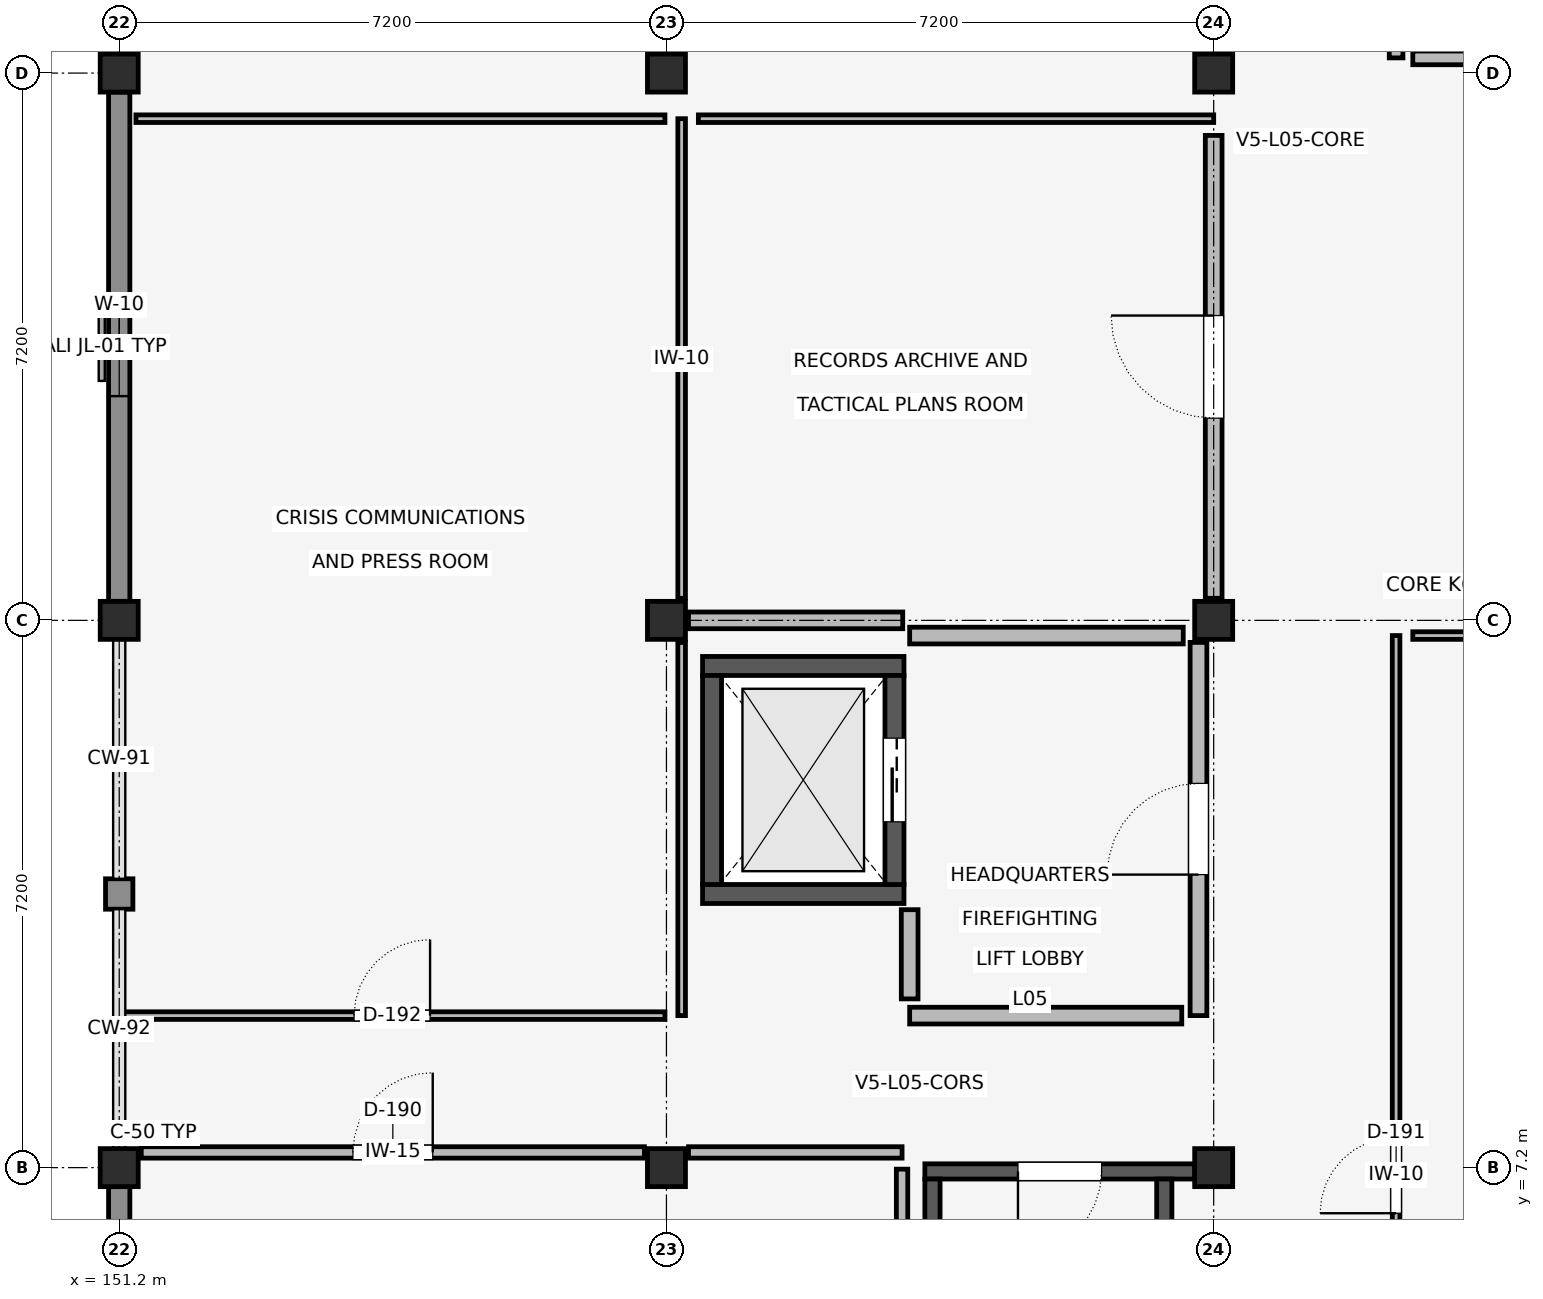
"""IFC4 building model, lengths in metres.
Left out: names, types, materials, properties, quantities, classifications, styles, units other than length and angle.
Written with IfcOpenShell. Run it as: python <this file> out.ifc"""

import sys

from ifc_helpers import new_model, si_unit, direction, frame, frame_2d, origin, origin_2d, place, context, subcontext, project, spatial, rectangle, extrude, element, fill, save


model = new_model("IFC4")
c1 = context("Model", 3, precision=1e-05, world=origin(), true_north=direction((0.0, 1.0)))
c2 = subcontext(c1, "Body", "Model", "MODEL_VIEW")
j1 = project(units=[si_unit("LENGTHUNIT", "METRE"), si_unit("PLANEANGLEUNIT", "RADIAN")], contexts=[c1])
p1 = place(None, origin())
s1 = spatial("IfcSite", under=j1, at=p1, CompositionType="ELEMENT")
p2 = place(p1, origin())
s2 = spatial("IfcBuilding", under=s1, at=p2, CompositionType="ELEMENT")
p3 = place(p2, frame((0.0, 0.0, 21.3)))
s3 = spatial("IfcBuildingStorey", under=s2, at=p3, CompositionType="ELEMENT", Elevation=21.3)
for number, where, z_axis, x_axis in (
    (1, (151.2, 7.2, 0.0), (0.0, 0.0, 1.0), (1.0, 0.0, 0.0)),
    (2, (151.2, 14.4, 0.0), (0.0, 0.0, 1.0), (1.0, 0.0, 0.0)),
    (3, (151.2, 21.6, 0.0), (0.0, 0.0, 1.0), (1.0, 0.0, 0.0)),
    (4, (158.4, 7.2, 0.0), (0.0, 0.0, 1.0), (1.0, 0.0, 0.0)),
    (5, (158.4, 14.4, 0.0), (0.0, 0.0, 1.0), (1.0, 0.0, 0.0)),
    (6, (158.4, 21.6, 0.0), (0.0, 0.0, 1.0), (1.0, 0.0, 0.0)),
    (7, (165.6, 7.2, 0.0), (0.0, 0.0, 1.0), (1.0, 0.0, 0.0)),
    (8, (165.6, 14.4, 0.0), (0.0, 0.0, 1.0), (1.0, 0.0, 0.0)),
    (9, (165.6, 21.6, 0.0), (0.0, 0.0, 1.0), (1.0, 0.0, 0.0)),
):
    element("IfcColumn", number, at=place(p3, frame(where, z_axis=z_axis, x_axis=x_axis)), inside=s3, PredefinedType="COLUMN", context=c2, shape_type="SweptSolid", body=[
        extrude(rectangle(XDim=0.5, YDim=0.5, at=origin_2d()), origin(), (0.0, 0.0, 1.0), 3.9),
    ])
for number, where, z_axis, x_axis in (
    (10, (158.875, 10.8, 0.0), (0.0, 0.0, 1.0), (1.0, 0.0, 0.0)),
    (11, (158.875, 13.8, 0.0), (0.0, 0.0, 1.0), (1.0, 0.0, 0.0)),
):
    element("IfcWall", number, at=place(p3, frame(where, z_axis=z_axis, x_axis=x_axis)), inside=s3, PredefinedType="SHEAR", context=c2, shape_type="SweptSolid", body=[
        extrude(rectangle(XDim=2.65, YDim=0.25, at=frame_2d((1.325, 0.0))), origin(), (0.0, 0.0, 1.0), 3.65),
    ])
p4 = place(p3, frame((159.0, 10.925, 0.0), z_axis=(0.0, 0.0, 1.0), x_axis=(0.0, 1.0, 0.0)))
e12 = element("IfcWall", 12, at=p4, inside=s3, PredefinedType="SHEAR", context=c2, shape_type="SweptSolid", body=[
    extrude(rectangle(XDim=2.75, YDim=0.25, at=frame_2d((1.375, 0.0))), origin(), (0.0, 0.0, 1.0), 3.65),
])
p5 = place(p3, frame((161.4, 10.925, 0.0), z_axis=(0.0, 0.0, 1.0), x_axis=(0.0, 1.0, 0.0)))
e13 = element("IfcWall", 13, at=p5, inside=s3, PredefinedType="SHEAR", context=c2, shape_type="SweptSolid", body=[
    extrude(rectangle(XDim=2.75, YDim=0.25, at=frame_2d((1.375, 0.0))), origin(), (0.0, 0.0, 1.0), 3.65),
])
p6 = place(p5, frame((0.825, 0.0, 0.0)))
e14 = element("IfcOpeningElement", 14, at=p6, cuts=e13, PredefinedType="OPENING", context=c2, shape_type="SweptSolid", body=[
    extrude(rectangle(XDim=1.1, YDim=2.15, at=frame_2d((0.55, 1.075))), frame((0.0, 0.137, 0.0), z_axis=(0.0, -1.0, 0.0), x_axis=(1.0, 0.0, 0.0)), (0.0, 0.0, 1.0), 0.274),
])
p7 = place(p3, frame((161.8, 7.15, 0.0), z_axis=(0.0, 0.0, 1.0), x_axis=(1.0, 0.0, 0.0)))
e15 = element("IfcWall", 15, at=p7, inside=s3, PredefinedType="SHEAR", context=c2, shape_type="SweptSolid", body=[
    extrude(rectangle(XDim=3.55, YDim=0.2, at=frame_2d((1.775, 0.0))), origin(), (0.0, 0.0, 1.0), 3.65),
])
p8 = place(p7, frame((1.225, 0.0, 0.0)))
e16 = element("IfcOpeningElement", 16, at=p8, cuts=e15, PredefinedType="OPENING", context=c2, shape_type="SweptSolid", body=[
    extrude(rectangle(XDim=1.1, YDim=2.15, at=frame_2d((0.55, 1.075))), frame((0.0, 0.112, 0.0), z_axis=(0.0, -1.0, 0.0), x_axis=(1.0, 0.0, 0.0)), (0.0, 0.0, 1.0), 0.224),
])
for number, where, z_axis, x_axis in (
    (17, (161.9, 0.43, 0.0), (0.0, 0.0, 1.0), (0.0, 1.0, 0.0)),
    (18, (164.95, 0.43, 0.0), (0.0, 0.0, 1.0), (0.0, 1.0, 0.0)),
):
    element("IfcWall", number, at=place(p3, frame(where, z_axis=z_axis, x_axis=x_axis)), inside=s3, PredefinedType="SHEAR", context=c2, shape_type="SweptSolid", body=[
        extrude(rectangle(XDim=6.62, YDim=0.2, at=frame_2d((3.31, 0.0))), origin(), (0.0, 0.0, 1.0), 3.65),
    ])
p9 = place(p3, frame((151.2, 21.35, 0.0), z_axis=(0.0, 0.0, 1.0), x_axis=(0.0, -1.0, 0.0)))
e19 = element("IfcWall", 19, at=p9, inside=s3, PredefinedType="ELEMENTEDWALL", context=c2, shape_type="SweptSolid", body=[
    extrude(rectangle(XDim=6.7, YDim=0.28, at=frame_2d((3.35, 0.0))), origin(), (0.0, 0.0, 1.0), 2.99),
])
p10 = place(p9, frame((2.7, 0.0, 0.85)))
e20 = element("IfcOpeningElement", 20, at=p10, cuts=e19, PredefinedType="OPENING", context=c2, shape_type="SweptSolid", body=[
    extrude(rectangle(XDim=1.3, YDim=1.85, at=frame_2d((0.65, 0.925))), frame((0.0, 0.152, 0.0), z_axis=(0.0, -1.0, 0.0), x_axis=(1.0, 0.0, 0.0)), (0.0, 0.0, 1.0), 0.304),
])
p11 = place(p3, frame((151.2, 11.0, 0.0), z_axis=(0.0, 0.0, 1.0), x_axis=(0.0, -1.0, 0.0)))
e21 = element("IfcWall", 21, at=p11, inside=s3, PredefinedType="SOLIDWALL", context=c2, shape_type="SweptSolid", body=[
    extrude(rectangle(XDim=0.4, YDim=0.36, at=frame_2d((0.2, 0.0))), origin(), (0.0, 0.0, 1.0), 3.04),
])
p12 = place(p3, frame((151.2, 6.95, 0.0), z_axis=(0.0, 0.0, 1.0), x_axis=(0.0, -1.0, 0.0)))
e22 = element("IfcWall", 22, at=p12, inside=s3, PredefinedType="ELEMENTEDWALL", context=c2, shape_type="SweptSolid", body=[
    extrude(rectangle(XDim=6.7, YDim=0.28, at=frame_2d((3.35, 0.0))), origin(), (0.0, 0.0, 1.0), 2.99),
])
p13 = place(p12, frame((2.9, 0.0, 0.8)))
e23 = element("IfcOpeningElement", 23, at=p13, cuts=e22, PredefinedType="OPENING", context=c2, shape_type="SweptSolid", body=[
    extrude(rectangle(XDim=0.9, YDim=2.0, at=frame_2d((0.45, 1.0))), frame((0.0, 0.152, 0.0), z_axis=(0.0, -1.0, 0.0), x_axis=(1.0, 0.0, 0.0)), (0.0, 0.0, 1.0), 0.304),
])
p14 = place(p3, frame((165.4, 9.2, 0.0), z_axis=(0.0, 0.0, 1.0), x_axis=(0.0, 1.0, 0.0)))
e24 = element("IfcWall", 24, at=p14, inside=s3, PredefinedType="STANDARD", context=c2, shape_type="SweptSolid", body=[
    extrude(rectangle(XDim=4.91, YDim=0.22, at=frame_2d((2.455, 0.0))), origin(), (0.0, 0.0, 1.0), 3.038),
])
p15 = place(p14, frame((1.855, 0.0, 0.0)))
e25 = element("IfcOpeningElement", 25, at=p15, cuts=e24, PredefinedType="OPENING", context=c2, shape_type="SweptSolid", body=[
    extrude(rectangle(XDim=1.2, YDim=2.2, at=frame_2d((0.6, 1.1))), frame((0.0, 0.122, 0.0), z_axis=(0.0, -1.0, 0.0), x_axis=(1.0, 0.0, 0.0)), (0.0, 0.0, 1.0), 0.244),
])
p16 = place(p3, frame((161.6, 9.2, 0.0), z_axis=(0.0, 0.0, 1.0), x_axis=(1.0, 0.0, 0.0)))
e26 = element("IfcWall", 26, at=p16, inside=s3, PredefinedType="STANDARD", context=c2, shape_type="SweptSolid", body=[
    extrude(rectangle(XDim=3.58, YDim=0.22, at=frame_2d((1.79, 0.0))), origin(), (0.0, 0.0, 1.0), 3.62),
])
p17 = place(p3, frame((161.6, 14.2, 0.0), z_axis=(0.0, 0.0, 1.0), x_axis=(1.0, 0.0, 0.0)))
e27 = element("IfcWall", 27, at=p17, inside=s3, PredefinedType="STANDARD", context=c2, shape_type="SweptSolid", body=[
    extrude(rectangle(XDim=3.599, YDim=0.22, at=frame_2d((1.8, 0.0))), origin(), (0.0, 0.0, 1.0), 2.938),
])
p18 = place(p3, frame((161.6, 9.42, 0.0), z_axis=(0.0, 0.0, 1.0), x_axis=(0.0, 1.0, 0.0)))
e28 = element("IfcWall", 28, at=p18, inside=s3, PredefinedType="STANDARD", context=c2, shape_type="SweptSolid", body=[
    extrude(rectangle(XDim=1.174, YDim=0.22, at=frame_2d((0.587, 0.0))), origin(), (0.0, 0.0, 1.0), 3.62),
])
p19 = place(p3, frame((151.49, 7.4, 0.0), z_axis=(0.0, 0.0, 1.0), x_axis=(1.0, 0.0, 0.0)))
e29 = element("IfcWall", 29, at=p19, inside=s3, PredefinedType="STANDARD", context=c2, shape_type="SweptSolid", body=[
    extrude(rectangle(XDim=6.62, YDim=0.15, at=frame_2d((3.31, 0.0))), origin(), (0.0, 0.0, 1.0), 2.888),
])
p20 = place(p19, frame((2.785, 0.0, 0.0)))
e30 = element("IfcOpeningElement", 30, at=p20, cuts=e29, PredefinedType="OPENING", context=c2, shape_type="SweptSolid", body=[
    extrude(rectangle(XDim=1.05, YDim=2.15, at=frame_2d((0.525, 1.075))), frame((0.0, 0.087, 0.0), z_axis=(0.0, -1.0, 0.0), x_axis=(1.0, 0.0, 0.0)), (0.0, 0.0, 1.0), 0.174),
])
p21 = place(p3, frame((158.69, 7.4, 0.0), z_axis=(0.0, 0.0, 1.0), x_axis=(1.0, 0.0, 0.0)))
e31 = element("IfcWall", 31, at=p21, inside=s3, PredefinedType="STANDARD", context=c2, shape_type="SweptSolid", body=[
    extrude(rectangle(XDim=2.81, YDim=0.15, at=frame_2d((1.405, 0.0))), origin(), (0.0, 0.0, 1.0), 3.62),
])
p22 = place(p3, frame((161.5, 0.22, 0.0), z_axis=(0.0, 0.0, 1.0), x_axis=(0.0, 1.0, 0.0)))
e32 = element("IfcWall", 32, at=p22, inside=s3, PredefinedType="STANDARD", context=c2, shape_type="SweptSolid", body=[
    extrude(rectangle(XDim=6.96, YDim=0.15, at=frame_2d((3.48, 0.0))), origin(), (0.0, 0.0, 1.0), 3.62),
])
p23 = place(p3, frame((168.0, 0.0, 0.0), z_axis=(0.0, 0.0, 1.0), x_axis=(0.0, 1.0, 0.0)))
e33 = element("IfcWall", 33, at=p23, inside=s3, PredefinedType="PARTITIONING", context=c2, shape_type="SweptSolid", body=[
    extrude(rectangle(XDim=14.2, YDim=0.1, at=frame_2d((7.1, 0.0))), origin(), (0.0, 0.0, 1.0), 2.938),
])
p24 = place(p23, frame((6.6, 0.0, 0.0)))
e34 = element("IfcOpeningElement", 34, at=p24, cuts=e33, PredefinedType="OPENING", context=c2, shape_type="SweptSolid", body=[
    extrude(rectangle(XDim=1.0, YDim=2.15, at=frame_2d((0.5, 1.075))), frame((0.0, 0.062, 0.0), z_axis=(0.0, -1.0, 0.0), x_axis=(1.0, 0.0, 0.0)), (0.0, 0.0, 1.0), 0.124),
])
p25 = place(p3, frame((168.22, 14.2, 0.0), z_axis=(0.0, 0.0, 1.0), x_axis=(1.0, 0.0, 0.0)))
e35 = element("IfcWall", 35, at=p25, inside=s3, PredefinedType="PARTITIONING", context=c2, shape_type="SweptSolid", body=[
    extrude(rectangle(XDim=4.29, YDim=0.1, at=frame_2d((2.145, 0.0))), origin(), (0.0, 0.0, 1.0), 3.62),
])
p26 = place(p3, frame((158.6, 9.2, 0.0), z_axis=(0.0, 0.0, 1.0), x_axis=(0.0, 1.0, 0.0)))
e36 = element("IfcWall", 36, at=p26, inside=s3, PredefinedType="PARTITIONING", context=c2, shape_type="SweptSolid", body=[
    extrude(rectangle(XDim=4.91, YDim=0.1, at=frame_2d((2.455, 0.0))), origin(), (0.0, 0.0, 1.0), 3.038),
])
p27 = place(p3, frame((158.6, 14.69, 0.0), z_axis=(0.0, 0.0, 1.0), x_axis=(0.0, 1.0, 0.0)))
e37 = element("IfcWall", 37, at=p27, inside=s3, PredefinedType="PARTITIONING", context=c2, shape_type="SweptSolid", body=[
    extrude(rectangle(XDim=6.31, YDim=0.1, at=frame_2d((3.155, 0.0))), origin(), (0.0, 0.0, 1.0), 2.988),
])
p28 = place(p3, frame((151.2, 9.2, 0.0), z_axis=(0.0, 0.0, 1.0), x_axis=(1.0, 0.0, 0.0)))
e38 = element("IfcWall", 38, at=p28, inside=s3, PredefinedType="PARTITIONING", context=c2, shape_type="SweptSolid", body=[
    extrude(rectangle(XDim=7.18, YDim=0.1, at=frame_2d((3.59, 0.0))), origin(), (0.0, 0.0, 1.0), 3.038),
])
p29 = place(p28, frame((3.09, 0.0, 0.0)))
e39 = element("IfcOpeningElement", 39, at=p29, cuts=e38, PredefinedType="OPENING", context=c2, shape_type="SweptSolid", body=[
    extrude(rectangle(XDim=1.0, YDim=2.15, at=frame_2d((0.5, 1.075))), frame((0.0, 0.062, 0.0), z_axis=(0.0, -1.0, 0.0), x_axis=(1.0, 0.0, 0.0)), (0.0, 0.0, 1.0), 0.124),
])
p30 = place(p3, frame((151.42, 21.0, 0.0), z_axis=(0.0, 0.0, 1.0), x_axis=(1.0, 0.0, 0.0)))
e40 = element("IfcWall", 40, at=p30, inside=s3, PredefinedType="PARTITIONING", context=c2, shape_type="SweptSolid", body=[
    extrude(rectangle(XDim=6.96, YDim=0.1, at=frame_2d((3.48, 0.0))), origin(), (0.0, 0.0, 1.0), 2.988),
])
p31 = place(p3, frame((158.82, 21.0, 0.0), z_axis=(0.0, 0.0, 1.0), x_axis=(1.0, 0.0, 0.0)))
e41 = element("IfcWall", 41, at=p31, inside=s3, PredefinedType="PARTITIONING", context=c2, shape_type="SweptSolid", body=[
    extrude(rectangle(XDim=6.78, YDim=0.1, at=frame_2d((3.39, 0.0))), origin(), (0.0, 0.0, 1.0), 2.988),
])
p32 = place(p3, frame((165.6, 14.69, 0.0), z_axis=(0.0, 0.0, 1.0), x_axis=(0.0, 1.0, 0.0)))
e42 = element("IfcWall", 42, at=p32, inside=s3, PredefinedType="STANDARD", context=c2, shape_type="SweptSolid", body=[
    extrude(rectangle(XDim=6.09, YDim=0.22, at=frame_2d((3.045, 0.0))), origin(), (0.0, 0.0, 1.0), 2.988),
])
p33 = place(p32, frame((2.37, 0.0, 0.0)))
e43 = element("IfcOpeningElement", 43, at=p33, cuts=e42, PredefinedType="OPENING", context=c2, shape_type="SweptSolid", body=[
    extrude(rectangle(XDim=1.35, YDim=2.2, at=frame_2d((0.675, 1.1))), frame((0.0, 0.122, 0.0), z_axis=(0.0, -1.0, 0.0), x_axis=(1.0, 0.0, 0.0)), (0.0, 0.0, 1.0), 0.244),
])
p34 = place(p3, frame((158.69, 14.4, 0.0), z_axis=(0.0, 0.0, 1.0), x_axis=(1.0, 0.0, 0.0)))
e44 = element("IfcWall", 44, at=p34, inside=s3, PredefinedType="STANDARD", context=c2, shape_type="SweptSolid", body=[
    extrude(rectangle(XDim=2.819, YDim=0.22, at=frame_2d((1.409, 0.0))), origin(), (0.0, 0.0, 1.0), 2.938),
])
p35 = place(p3, frame((168.0, 21.8, 0.0), z_axis=(0.0, 0.0, 1.0), x_axis=(0.0, 1.0, 0.0)))
e45 = element("IfcWall", 45, at=p35, inside=s3, PredefinedType="PLUMBINGWALL", context=c2, shape_type="SweptSolid", body=[
    extrude(rectangle(XDim=6.78, YDim=0.18, at=frame_2d((3.39, 0.0))), origin(), (0.0, 0.0, 1.0), 2.888),
])
p36 = place(p35, frame((2.94, 0.0, 0.0)))
e46 = element("IfcOpeningElement", 46, at=p36, cuts=e45, PredefinedType="OPENING", context=c2, shape_type="SweptSolid", body=[
    extrude(rectangle(XDim=0.9, YDim=2.1, at=frame_2d((0.45, 1.05))), frame((0.0, 0.102, 0.0), z_axis=(0.0, -1.0, 0.0), x_axis=(1.0, 0.0, 0.0)), (0.0, 0.0, 1.0), 0.204),
])
p37 = place(p3, frame((168.22, 21.8, 0.0), z_axis=(0.0, 0.0, 1.0), x_axis=(1.0, 0.0, 0.0)))
e47 = element("IfcWall", 47, at=p37, inside=s3, PredefinedType="PLUMBINGWALL", context=c2, shape_type="SweptSolid", body=[
    extrude(rectangle(XDim=4.29, YDim=0.18, at=frame_2d((2.145, 0.0))), origin(), (0.0, 0.0, 1.0), 2.888),
])
p38 = place(p10, origin())
e48 = element("IfcWindow", 48, at=p38, inside=s3, PartitioningType="SINGLE_PANEL", PredefinedType="WINDOW", context=c2, shape_type="SweptSolid", body=[
    extrude(rectangle(XDim=1.3, YDim=1.85, at=frame_2d((0.65, 0.925))), frame((0.0, 0.03, 0.0), z_axis=(0.0, -1.0, 0.0), x_axis=(1.0, 0.0, 0.0)), (0.0, 0.0, 1.0), 0.06),
])
fill(e20, e48)
p39 = place(p8, frame((1.1, 0.0, 0.0), z_axis=(0.0, 0.0, 1.0), x_axis=(-1.0, 0.0, 0.0)))
e49 = element("IfcDoor", 49, at=p39, inside=s3, OperationType="SINGLE_SWING_RIGHT", PredefinedType="DOOR", context=c2, shape_type="SweptSolid", body=[
    extrude(rectangle(XDim=1.1, YDim=2.15, at=frame_2d((0.55, 1.075))), frame((0.0, 0.025, 0.0), z_axis=(0.0, -1.0, 0.0), x_axis=(1.0, 0.0, 0.0)), (0.0, 0.0, 1.0), 0.05),
])
fill(e16, e49)
p40 = place(p6, origin())
e50 = element("IfcDoor", 50, at=p40, inside=s3, OperationType="SLIDING_TO_LEFT", PredefinedType="DOOR", context=c2, shape_type="SweptSolid", body=[
    extrude(rectangle(XDim=1.1, YDim=2.15, at=frame_2d((0.55, 1.075))), frame((0.0, 0.025, 0.0), z_axis=(0.0, -1.0, 0.0), x_axis=(1.0, 0.0, 0.0)), (0.0, 0.0, 1.0), 0.05),
])
fill(e14, e50)
p41 = place(p15, origin())
e51 = element("IfcDoor", 51, at=p41, inside=s3, OperationType="SINGLE_SWING_LEFT", PredefinedType="DOOR", context=c2, shape_type="SweptSolid", body=[
    extrude(rectangle(XDim=1.2, YDim=2.2, at=frame_2d((0.6, 1.1))), frame((0.0, 0.025, 0.0), z_axis=(0.0, -1.0, 0.0), x_axis=(1.0, 0.0, 0.0)), (0.0, 0.0, 1.0), 0.05),
])
fill(e25, e51)
p42 = place(p20, origin())
e52 = element("IfcDoor", 52, at=p42, inside=s3, OperationType="SINGLE_SWING_RIGHT", PredefinedType="DOOR", context=c2, shape_type="SweptSolid", body=[
    extrude(rectangle(XDim=1.05, YDim=2.15, at=frame_2d((0.525, 1.075))), frame((0.0, 0.025, 0.0), z_axis=(0.0, -1.0, 0.0), x_axis=(1.0, 0.0, 0.0)), (0.0, 0.0, 1.0), 0.05),
])
fill(e30, e52)
p43 = place(p24, origin())
e53 = element("IfcDoor", 53, at=p43, inside=s3, OperationType="SINGLE_SWING_LEFT", PredefinedType="DOOR", context=c2, shape_type="SweptSolid", body=[
    extrude(rectangle(XDim=1.0, YDim=2.15, at=frame_2d((0.5, 1.075))), frame((0.0, 0.025, 0.0), z_axis=(0.0, -1.0, 0.0), x_axis=(1.0, 0.0, 0.0)), (0.0, 0.0, 1.0), 0.05),
])
fill(e34, e53)
p44 = place(p29, origin())
e54 = element("IfcDoor", 54, at=p44, inside=s3, OperationType="SINGLE_SWING_RIGHT", PredefinedType="DOOR", context=c2, shape_type="SweptSolid", body=[
    extrude(rectangle(XDim=1.0, YDim=2.15, at=frame_2d((0.5, 1.075))), frame((0.0, 0.025, 0.0), z_axis=(0.0, -1.0, 0.0), x_axis=(1.0, 0.0, 0.0)), (0.0, 0.0, 1.0), 0.05),
])
fill(e39, e54)
p45 = place(p33, origin())
e55 = element("IfcDoor", 55, at=p45, inside=s3, OperationType="SINGLE_SWING_RIGHT", PredefinedType="DOOR", context=c2, shape_type="SweptSolid", body=[
    extrude(rectangle(XDim=1.35, YDim=2.2, at=frame_2d((0.675, 1.1))), frame((0.0, 0.025, 0.0), z_axis=(0.0, -1.0, 0.0), x_axis=(1.0, 0.0, 0.0)), (0.0, 0.0, 1.0), 0.05),
])
fill(e43, e55)
save(model, sys.argv[1])
